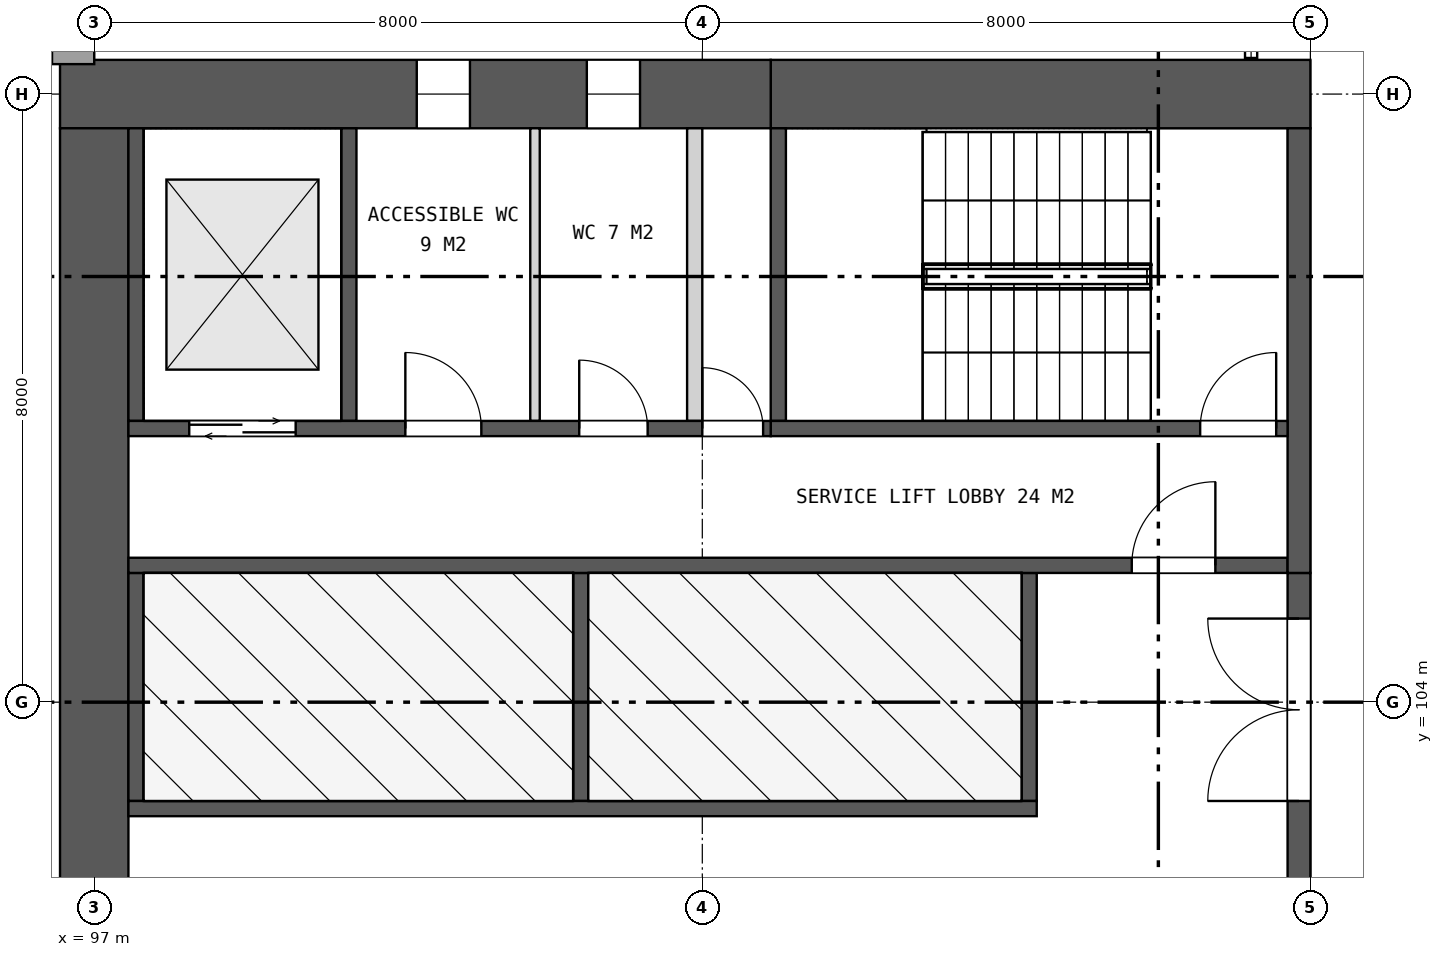
"""IFC4 building model, lengths in metres.
Left out: names, types, materials, properties, quantities, classifications, styles, units other than length and angle.
Written with IfcOpenShell. Run it as: python <this file> out.ifc"""

import sys

from ifc_helpers import new_model, si_unit, direction, frame, frame_2d, origin, place, context, subcontext, project, spatial, rectangle, extrude, element, fill, save


model = new_model("IFC4")
c1 = context("Model", 3, precision=1e-05, world=origin(), true_north=direction((0.0, 1.0)))
c2 = subcontext(c1, "Body", "Model", "MODEL_VIEW")
j1 = project(units=[si_unit("LENGTHUNIT", "METRE"), si_unit("PLANEANGLEUNIT", "RADIAN")], contexts=[c1])
p1 = place(None, origin())
s1 = spatial("IfcSite", under=j1, at=p1, CompositionType="ELEMENT")
p2 = place(p1, origin())
s2 = spatial("IfcBuilding", under=s1, at=p2, CompositionType="ELEMENT")
p3 = place(p2, frame((0.0, 0.0, 34.0)))
s3 = spatial("IfcBuildingStorey", under=s2, at=p3, CompositionType="ELEMENT", Elevation=34.0)
p4 = place(p3, frame((113.0, 112.0, 0.0), z_axis=(0.0, 0.0, 1.0), x_axis=(-1.0, 0.0, 0.0)))
e1 = element("IfcWall", 1, at=p4, inside=s3, PredefinedType="SHEAR", context=c2, shape_type="SweptSolid", body=[
    extrude(rectangle(XDim=7.1, YDim=0.9, at=frame_2d((3.55, 0.0))), origin(), (0.0, 0.0, 1.0), 7.5),
])
p5 = place(p3, frame((105.9, 112.0, 0.0), z_axis=(0.0, 0.0, 1.0), x_axis=(-1.0, 0.0, 0.0)))
e2 = element("IfcWall", 2, at=p5, inside=s3, PredefinedType="SHEAR", context=c2, shape_type="SweptSolid", body=[
    extrude(rectangle(XDim=9.35, YDim=0.9, at=frame_2d((4.675, 0.0))), origin(), (0.0, 0.0, 1.0), 7.5),
])
p6 = place(p5, frame((1.719, 0.0, 1.5)))
e3 = element("IfcOpeningElement", 3, at=p6, cuts=e2, PredefinedType="OPENING", context=c2, shape_type="SweptSolid", body=[
    extrude(rectangle(XDim=0.7, YDim=0.9, at=frame_2d((0.35, 0.45))), frame((0.0, 0.46, 0.0), z_axis=(0.0, -1.0, 0.0), x_axis=(1.0, 0.0, 0.0)), (0.0, 0.0, 1.0), 0.92),
])
p7 = place(p5, frame((3.957, 0.0, 1.5)))
e4 = element("IfcOpeningElement", 4, at=p7, cuts=e2, PredefinedType="OPENING", context=c2, shape_type="SweptSolid", body=[
    extrude(rectangle(XDim=0.7, YDim=0.9, at=frame_2d((0.35, 0.45))), frame((0.0, 0.46, 0.0), z_axis=(0.0, -1.0, 0.0), x_axis=(1.0, 0.0, 0.0)), (0.0, 0.0, 1.0), 0.92),
])
p8 = place(p3, frame((97.0, 111.55, 0.0), z_axis=(0.0, 0.0, 1.0), x_axis=(0.0, -1.0, 0.0)))
e5 = element("IfcWall", 5, at=p8, inside=s3, PredefinedType="SHEAR", context=c2, shape_type="SweptSolid", body=[
    extrude(rectangle(XDim=23.1, YDim=0.9, at=frame_2d((11.55, 0.0))), origin(), (0.0, 0.0, 1.0), 7.5),
])
p9 = place(p8, frame((10.35, 0.0, 0.0)))
e6 = element("IfcOpeningElement", 6, at=p9, cuts=e5, PredefinedType="OPENING", context=c2, shape_type="SweptSolid", body=[
    extrude(rectangle(XDim=2.4, YDim=2.4, at=frame_2d((1.2, 1.2))), frame((0.0, 0.46, 0.0), z_axis=(0.0, -1.0, 0.0), x_axis=(1.0, 0.0, 0.0)), (0.0, 0.0, 1.0), 0.92),
])
p10 = place(p3, frame((112.85, 105.7, 0.0), z_axis=(0.0, 0.0, 1.0), x_axis=(0.0, -1.0, 0.0)))
e7 = element("IfcWall", 7, at=p10, inside=s3, PredefinedType="SHEAR", context=c2, shape_type="SweptSolid", body=[
    extrude(rectangle(XDim=11.4, YDim=0.3, at=frame_2d((5.7, 0.0))), origin(), (0.0, 0.0, 1.0), 7.5),
])
p11 = place(p10, frame((0.6, 0.0, 0.0)))
e8 = element("IfcOpeningElement", 8, at=p11, cuts=e7, PredefinedType="OPENING", context=c2, shape_type="SweptSolid", body=[
    extrude(rectangle(XDim=2.4, YDim=2.4, at=frame_2d((1.2, 1.2))), frame((0.0, 0.16, 0.0), z_axis=(0.0, -1.0, 0.0), x_axis=(1.0, 0.0, 0.0)), (0.0, 0.0, 1.0), 0.32),
])
p12 = place(p10, frame((4.5, 0.0, 0.0)))
e9 = element("IfcOpeningElement", 9, at=p12, cuts=e7, PredefinedType="OPENING", context=c2, shape_type="SweptSolid", body=[
    extrude(rectangle(XDim=2.4, YDim=2.4, at=frame_2d((1.2, 1.2))), frame((0.0, 0.16, 0.0), z_axis=(0.0, -1.0, 0.0), x_axis=(1.0, 0.0, 0.0)), (0.0, 0.0, 1.0), 0.32),
])
p13 = place(p10, frame((8.4, 0.0, 0.0)))
e10 = element("IfcOpeningElement", 10, at=p13, cuts=e7, PredefinedType="OPENING", context=c2, shape_type="SweptSolid", body=[
    extrude(rectangle(XDim=2.4, YDim=2.4, at=frame_2d((1.2, 1.2))), frame((0.0, 0.16, 0.0), z_axis=(0.0, -1.0, 0.0), x_axis=(1.0, 0.0, 0.0)), (0.0, 0.0, 1.0), 0.32),
])
for number, where, z_axis, x_axis in (
    (11, (109.3, 105.7, 0.0), (0.0, 0.0, 1.0), (0.0, -1.0, 0.0)),
    (12, (103.4, 105.7, 0.0), (0.0, 0.0, 1.0), (0.0, -1.0, 0.0)),
    (13, (97.55, 105.7, 0.0), (0.0, 0.0, 1.0), (0.0, -1.0, 0.0)),
):
    element("IfcWall", number, at=place(p3, frame(where, z_axis=z_axis, x_axis=x_axis)), inside=s3, PredefinedType="SHEAR", context=c2, shape_type="SweptSolid", body=[
        extrude(rectangle(XDim=3.0, YDim=0.2, at=frame_2d((1.5, 0.0))), origin(), (0.0, 0.0, 1.0), 7.5),
    ])
p14 = place(p3, frame((109.4, 102.6, 0.0), z_axis=(0.0, 0.0, 1.0), x_axis=(-1.0, 0.0, 0.0)))
e14 = element("IfcWall", 14, at=p14, inside=s3, PredefinedType="SHEAR", context=c2, shape_type="SweptSolid", body=[
    extrude(rectangle(XDim=11.95, YDim=0.2, at=frame_2d((5.975, 0.0))), origin(), (0.0, 0.0, 1.0), 7.5),
])
p15 = place(p3, frame((112.7, 105.8, 0.0), z_axis=(0.0, 0.0, 1.0), x_axis=(-1.0, 0.0, 0.0)))
e15 = element("IfcWall", 15, at=p15, inside=s3, PredefinedType="SHEAR", context=c2, shape_type="SweptSolid", body=[
    extrude(rectangle(XDim=15.25, YDim=0.2, at=frame_2d((7.625, 0.0))), origin(), (0.0, 0.0, 1.0), 7.5),
])
p16 = place(p15, frame((0.95, 0.0, 0.0)))
e16 = element("IfcOpeningElement", 16, at=p16, cuts=e15, PredefinedType="OPENING", context=c2, shape_type="SweptSolid", body=[
    extrude(rectangle(XDim=1.1, YDim=2.1, at=frame_2d((0.55, 1.05))), frame((0.0, 0.11, 0.0), z_axis=(0.0, -1.0, 0.0), x_axis=(1.0, 0.0, 0.0)), (0.0, 0.0, 1.0), 0.22),
])
p17 = place(p3, frame((112.85, 111.55, 0.0), z_axis=(0.0, 0.0, 1.0), x_axis=(0.0, -1.0, 0.0)))
e17 = element("IfcWall", 17, at=p17, inside=s3, PredefinedType="SHEAR", context=c2, shape_type="SweptSolid", body=[
    extrude(rectangle(XDim=5.85, YDim=0.3, at=frame_2d((2.925, 0.0))), origin(), (0.0, 0.0, 1.0), 7.5),
])
for number, where, z_axis, x_axis in (
    (18, (106.0, 111.55, 0.0), (0.0, 0.0, 1.0), (0.0, -1.0, 0.0)),
    (19, (100.35, 111.55, 0.0), (0.0, 0.0, 1.0), (0.0, -1.0, 0.0)),
    (20, (97.55, 111.55, 0.0), (0.0, 0.0, 1.0), (0.0, -1.0, 0.0)),
):
    element("IfcWall", number, at=place(p3, frame(where, z_axis=z_axis, x_axis=x_axis)), inside=s3, PredefinedType="SHEAR", context=c2, shape_type="SweptSolid", body=[
        extrude(rectangle(XDim=3.85, YDim=0.2, at=frame_2d((1.925, 0.0))), origin(), (0.0, 0.0, 1.0), 7.5),
    ])
p18 = place(p3, frame((104.9, 111.55, 0.0), z_axis=(0.0, 0.0, 1.0), x_axis=(0.0, -1.0, 0.0)))
e21 = element("IfcWall", 21, at=p18, inside=s3, PredefinedType="PARTITIONING", context=c2, shape_type="SweptSolid", body=[
    extrude(rectangle(XDim=3.85, YDim=0.2, at=frame_2d((1.925, 0.0))), origin(), (0.0, 0.0, 1.0), 7.5),
])
p19 = place(p3, frame((102.799, 111.55, 0.0), z_axis=(0.0, 0.0, 1.0), x_axis=(0.0, -1.0, 0.0)))
e22 = element("IfcWall", 22, at=p19, inside=s3, PredefinedType="PARTITIONING", context=c2, shape_type="SweptSolid", body=[
    extrude(rectangle(XDim=3.85, YDim=0.125, at=frame_2d((1.925, 0.0))), origin(), (0.0, 0.0, 1.0), 7.5),
])
p20 = place(p3, frame((112.7, 107.6, 0.0), z_axis=(0.0, 0.0, 1.0), x_axis=(-1.0, 0.0, 0.0)))
e23 = element("IfcWall", 23, at=p20, inside=s3, PredefinedType="SHEAR", context=c2, shape_type="SweptSolid", body=[
    extrude(rectangle(XDim=6.8, YDim=0.2, at=frame_2d((3.4, 0.0))), origin(), (0.0, 0.0, 1.0), 7.5),
])
p21 = place(p20, frame((0.15, 0.0, 0.0)))
e24 = element("IfcOpeningElement", 24, at=p21, cuts=e23, PredefinedType="OPENING", context=c2, shape_type="SweptSolid", body=[
    extrude(rectangle(XDim=1.0, YDim=2.1, at=frame_2d((0.5, 1.05))), frame((0.0, 0.11, 0.0), z_axis=(0.0, -1.0, 0.0), x_axis=(1.0, 0.0, 0.0)), (0.0, 0.0, 1.0), 0.22),
])
p22 = place(p3, frame((105.9, 107.6, 0.0), z_axis=(0.0, 0.0, 1.0), x_axis=(-1.0, 0.0, 0.0)))
e25 = element("IfcWall", 25, at=p22, inside=s3, PredefinedType="SHEAR", context=c2, shape_type="SweptSolid", body=[
    extrude(rectangle(XDim=8.45, YDim=0.2, at=frame_2d((4.225, 0.0))), origin(), (0.0, 0.0, 1.0), 7.5),
])
p23 = place(p22, frame((0.1, 0.0, 0.0)))
e26 = element("IfcOpeningElement", 26, at=p23, cuts=e25, PredefinedType="OPENING", context=c2, shape_type="SweptSolid", body=[
    extrude(rectangle(XDim=0.8, YDim=2.1, at=frame_2d((0.4, 1.05))), frame((0.0, 0.11, 0.0), z_axis=(0.0, -1.0, 0.0), x_axis=(1.0, 0.0, 0.0)), (0.0, 0.0, 1.0), 0.22),
])
p24 = place(p22, frame((1.619, 0.0, 0.0)))
e27 = element("IfcOpeningElement", 27, at=p24, cuts=e25, PredefinedType="OPENING", context=c2, shape_type="SweptSolid", body=[
    extrude(rectangle(XDim=0.9, YDim=2.1, at=frame_2d((0.45, 1.05))), frame((0.0, 0.11, 0.0), z_axis=(0.0, -1.0, 0.0), x_axis=(1.0, 0.0, 0.0)), (0.0, 0.0, 1.0), 0.22),
])
p25 = place(p22, frame((3.807, 0.0, 0.0)))
e28 = element("IfcOpeningElement", 28, at=p25, cuts=e25, PredefinedType="OPENING", context=c2, shape_type="SweptSolid", body=[
    extrude(rectangle(XDim=1.0, YDim=2.1, at=frame_2d((0.5, 1.05))), frame((0.0, 0.11, 0.0), z_axis=(0.0, -1.0, 0.0), x_axis=(1.0, 0.0, 0.0)), (0.0, 0.0, 1.0), 0.22),
])
p26 = place(p22, frame((6.25, 0.0, 0.0)))
e29 = element("IfcOpeningElement", 29, at=p26, cuts=e25, PredefinedType="OPENING", context=c2, shape_type="SweptSolid", body=[
    extrude(rectangle(XDim=1.4, YDim=2.1, at=frame_2d((0.7, 1.05))), frame((0.0, 0.11, 0.0), z_axis=(0.0, -1.0, 0.0), x_axis=(1.0, 0.0, 0.0)), (0.0, 0.0, 1.0), 0.22),
])
p27 = place(p3, frame((96.445, 112.547, 0.0), z_axis=(0.0, 0.0, 1.0), x_axis=(1.0, 0.0, 0.0)))
e30 = element("IfcWall", 30, at=p27, inside=s3, PredefinedType="SOLIDWALL", context=c2, shape_type="SweptSolid", body=[
    extrude(rectangle(XDim=0.555, YDim=0.306, at=frame_2d((0.277, 0.0))), origin(), (0.0, 0.0, 1.0), 7.1),
])
p28 = place(p6, origin())
e31 = element("IfcWindow", 31, at=p28, inside=s3, PartitioningType="SINGLE_PANEL", PredefinedType="WINDOW", context=c2, shape_type="SweptSolid", body=[
    extrude(rectangle(XDim=0.7, YDim=0.9, at=frame_2d((0.35, 0.45))), frame((0.0, 0.03, 0.0), z_axis=(0.0, -1.0, 0.0), x_axis=(1.0, 0.0, 0.0)), (0.0, 0.0, 1.0), 0.06),
])
fill(e3, e31)
p29 = place(p7, origin())
e32 = element("IfcWindow", 32, at=p29, inside=s3, PartitioningType="SINGLE_PANEL", PredefinedType="WINDOW", context=c2, shape_type="SweptSolid", body=[
    extrude(rectangle(XDim=0.7, YDim=0.9, at=frame_2d((0.35, 0.45))), frame((0.0, 0.03, 0.0), z_axis=(0.0, -1.0, 0.0), x_axis=(1.0, 0.0, 0.0)), (0.0, 0.0, 1.0), 0.06),
])
fill(e4, e32)
p30 = place(p11, frame((2.4, 0.0, 0.0), z_axis=(0.0, 0.0, 1.0), x_axis=(-1.0, 0.0, 0.0)))
e33 = element("IfcDoor", 33, at=p30, inside=s3, OperationType="DOUBLE_DOOR_SINGLE_SWING", PredefinedType="DOOR", context=c2, shape_type="SweptSolid", body=[
    extrude(rectangle(XDim=2.4, YDim=2.4, at=frame_2d((1.2, 1.2))), frame((0.0, 0.025, 0.0), z_axis=(0.0, -1.0, 0.0), x_axis=(1.0, 0.0, 0.0)), (0.0, 0.0, 1.0), 0.05),
])
fill(e8, e33)
p31 = place(p16, frame((1.1, 0.0, 0.0), z_axis=(0.0, 0.0, 1.0), x_axis=(-1.0, 0.0, 0.0)))
e34 = element("IfcDoor", 34, at=p31, inside=s3, OperationType="SINGLE_SWING_RIGHT", PredefinedType="DOOR", context=c2, shape_type="SweptSolid", body=[
    extrude(rectangle(XDim=1.1, YDim=2.1, at=frame_2d((0.55, 1.05))), frame((0.0, 0.025, 0.0), z_axis=(0.0, -1.0, 0.0), x_axis=(1.0, 0.0, 0.0)), (0.0, 0.0, 1.0), 0.05),
])
fill(e16, e34)
p32 = place(p21, frame((1.0, 0.0, 0.0), z_axis=(0.0, 0.0, 1.0), x_axis=(-1.0, 0.0, 0.0)))
e35 = element("IfcDoor", 35, at=p32, inside=s3, OperationType="SINGLE_SWING_RIGHT", PredefinedType="DOOR", context=c2, shape_type="SweptSolid", body=[
    extrude(rectangle(XDim=1.0, YDim=2.1, at=frame_2d((0.5, 1.05))), frame((0.0, 0.025, 0.0), z_axis=(0.0, -1.0, 0.0), x_axis=(1.0, 0.0, 0.0)), (0.0, 0.0, 1.0), 0.05),
])
fill(e24, e35)
p33 = place(p23, frame((0.8, 0.0, 0.0), z_axis=(0.0, 0.0, 1.0), x_axis=(-1.0, 0.0, 0.0)))
e36 = element("IfcDoor", 36, at=p33, inside=s3, OperationType="SINGLE_SWING_LEFT", PredefinedType="DOOR", context=c2, shape_type="SweptSolid", body=[
    extrude(rectangle(XDim=0.8, YDim=2.1, at=frame_2d((0.4, 1.05))), frame((0.0, 0.025, 0.0), z_axis=(0.0, -1.0, 0.0), x_axis=(1.0, 0.0, 0.0)), (0.0, 0.0, 1.0), 0.05),
])
fill(e26, e36)
p34 = place(p24, frame((0.9, 0.0, 0.0), z_axis=(0.0, 0.0, 1.0), x_axis=(-1.0, 0.0, 0.0)))
e37 = element("IfcDoor", 37, at=p34, inside=s3, OperationType="SINGLE_SWING_LEFT", PredefinedType="DOOR", context=c2, shape_type="SweptSolid", body=[
    extrude(rectangle(XDim=0.9, YDim=2.1, at=frame_2d((0.45, 1.05))), frame((0.0, 0.025, 0.0), z_axis=(0.0, -1.0, 0.0), x_axis=(1.0, 0.0, 0.0)), (0.0, 0.0, 1.0), 0.05),
])
fill(e27, e37)
p35 = place(p25, frame((1.0, 0.0, 0.0), z_axis=(0.0, 0.0, 1.0), x_axis=(-1.0, 0.0, 0.0)))
e38 = element("IfcDoor", 38, at=p35, inside=s3, OperationType="SINGLE_SWING_LEFT", PredefinedType="DOOR", context=c2, shape_type="SweptSolid", body=[
    extrude(rectangle(XDim=1.0, YDim=2.1, at=frame_2d((0.5, 1.05))), frame((0.0, 0.025, 0.0), z_axis=(0.0, -1.0, 0.0), x_axis=(1.0, 0.0, 0.0)), (0.0, 0.0, 1.0), 0.05),
])
fill(e28, e38)
p36 = place(p26, origin())
e39 = element("IfcDoor", 39, at=p36, inside=s3, OperationType="DOUBLE_DOOR_SLIDING", PredefinedType="DOOR", context=c2, shape_type="SweptSolid", body=[
    extrude(rectangle(XDim=1.4, YDim=2.1, at=frame_2d((0.7, 1.05))), frame((0.0, 0.025, 0.0), z_axis=(0.0, -1.0, 0.0), x_axis=(1.0, 0.0, 0.0)), (0.0, 0.0, 1.0), 0.05),
])
fill(e29, e39)
save(model, sys.argv[1])
